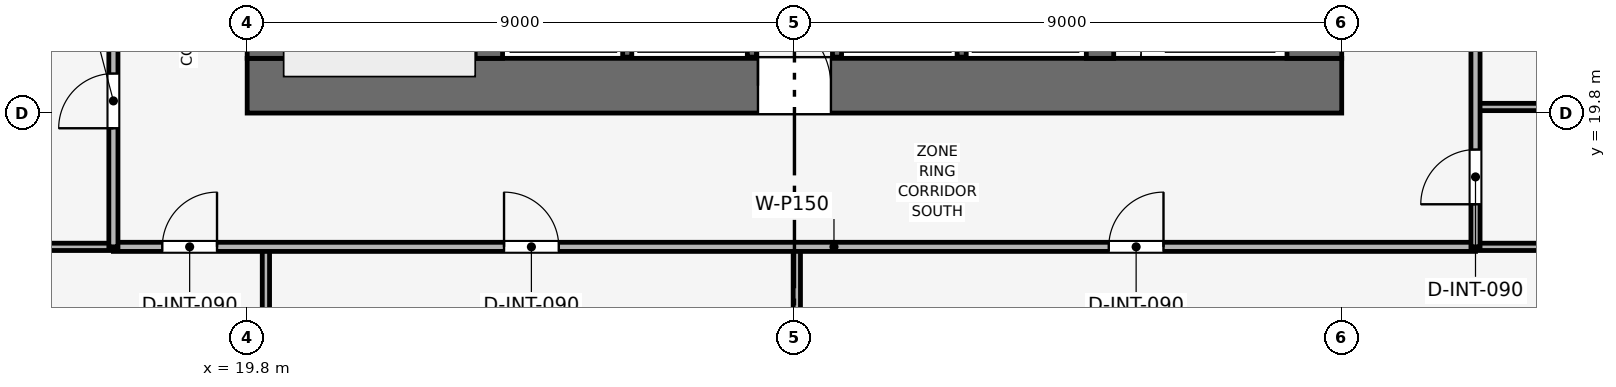
"""IFC4 building model, lengths in metres.
Left out: names, types, materials, properties, quantities, classifications, styles, units other than length and angle.
Written with IfcOpenShell. Run it as: python <this file> out.ifc"""

import sys

from ifc_helpers import new_model, si_unit, direction, frame, frame_2d, origin, place, context, subcontext, project, spatial, rectangle, extrude, element, fill, save


model = new_model("IFC4")
c1 = context("Model", 3, precision=1e-05, world=origin(), true_north=direction((0.0, 1.0)))
c2 = subcontext(c1, "Body", "Model", "MODEL_VIEW")
j1 = project(units=[si_unit("LENGTHUNIT", "METRE"), si_unit("PLANEANGLEUNIT", "RADIAN")], contexts=[c1])
p1 = place(None, origin())
s1 = spatial("IfcSite", under=j1, at=p1, CompositionType="ELEMENT")
p2 = place(p1, origin())
s2 = spatial("IfcBuilding", under=s1, at=p2, CompositionType="ELEMENT")
p3 = place(p2, frame((0.0, 0.0, 132.9)))
s3 = spatial("IfcBuildingStorey", under=s2, at=p3, CompositionType="ELEMENT", Elevation=132.9)
p4 = place(p3, frame((19.8, 20.25, 0.0), z_axis=(0.0, 0.0, 1.0), x_axis=(1.0, 0.0, 0.0)))
e1 = element("IfcWall", 1, at=p4, inside=s3, PredefinedType="SHEAR", context=c2, shape_type="SweptSolid", body=[
    extrude(rectangle(XDim=18.0, YDim=0.9, at=frame_2d((9.0, 0.0))), origin(), (0.0, 0.0, 1.0), 5.4),
])
p5 = place(p4, frame((8.4, 0.0, 0.0)))
e2 = element("IfcOpeningElement", 2, at=p5, cuts=e1, PredefinedType="OPENING", context=c2, shape_type="SweptSolid", body=[
    extrude(rectangle(XDim=1.2, YDim=2.2, at=frame_2d((0.6, 1.1))), frame((0.0, 0.46, 0.0), z_axis=(0.0, -1.0, 0.0), x_axis=(1.0, 0.0, 0.0)), (0.0, 0.0, 1.0), 0.92),
])
p6 = place(p3, frame((20.25, 20.7, 0.0), z_axis=(0.0, 0.0, 1.0), x_axis=(0.0, 1.0, 0.0)))
e3 = element("IfcWall", 3, at=p6, inside=s3, PredefinedType="SHEAR", context=c2, shape_type="SweptSolid", body=[
    extrude(rectangle(XDim=16.2, YDim=0.9, at=frame_2d((8.1, 0.0))), origin(), (0.0, 0.0, 1.0), 5.4),
])
p7 = place(p6, frame((10.1, 0.0, 0.0)))
e4 = element("IfcOpeningElement", 4, at=p7, cuts=e3, PredefinedType="OPENING", context=c2, shape_type="SweptSolid", body=[
    extrude(rectangle(XDim=1.1, YDim=2.15, at=frame_2d((0.55, 1.075))), frame((0.0, 0.46, 0.0), z_axis=(0.0, -1.0, 0.0), x_axis=(1.0, 0.0, 0.0)), (0.0, 0.0, 1.0), 0.92),
])
p8 = place(p3, frame((37.35, 20.7, 0.0), z_axis=(0.0, 0.0, 1.0), x_axis=(0.0, 1.0, 0.0)))
e5 = element("IfcWall", 5, at=p8, inside=s3, PredefinedType="SHEAR", context=c2, shape_type="SweptSolid", body=[
    extrude(rectangle(XDim=16.2, YDim=0.9, at=frame_2d((8.1, 0.0))), origin(), (0.0, 0.0, 1.0), 5.4),
])
p9 = place(p8, frame((4.6, 0.0, 0.0)))
e6 = element("IfcOpeningElement", 6, at=p9, cuts=e5, PredefinedType="OPENING", context=c2, shape_type="SweptSolid", body=[
    extrude(rectangle(XDim=1.1, YDim=2.15, at=frame_2d((0.55, 1.075))), frame((0.0, 0.46, 0.0), z_axis=(0.0, -1.0, 0.0), x_axis=(1.0, 0.0, 0.0)), (0.0, 0.0, 1.0), 0.92),
])
for number, where, z_axis, x_axis in (
    (7, (23.775, 20.7, 0.0), (0.0, 0.0, 1.0), (0.0, 1.0, 0.0)),
    (8, (33.825, 20.7, 0.0), (0.0, 0.0, 1.0), (0.0, 1.0, 0.0)),
):
    element("IfcWall", number, at=place(p3, frame(where, z_axis=z_axis, x_axis=x_axis)), inside=s3, PredefinedType="SHEAR", context=c2, shape_type="SweptSolid", body=[
        extrude(rectangle(XDim=16.2, YDim=0.45, at=frame_2d((8.1, 0.0))), origin(), (0.0, 0.0, 1.0), 5.4),
    ])
for number, where, z_axis, x_axis in (
    (9, (26.05, 20.72, 0.0), (0.0, 0.0, 1.0), (0.0, 1.0, 0.0)),
    (10, (28.1, 20.72, 0.0), (0.0, 0.0, 1.0), (0.0, 1.0, 0.0)),
    (11, (29.5, 20.72, 0.0), (0.0, 0.0, 1.0), (0.0, 1.0, 0.0)),
    (12, (31.55, 20.72, 0.0), (0.0, 0.0, 1.0), (0.0, 1.0, 0.0)),
):
    element("IfcWall", number, at=place(p3, frame(where, z_axis=z_axis, x_axis=x_axis)), inside=s3, PredefinedType="SHEAR", context=c2, shape_type="SweptSolid", body=[
        extrude(rectangle(XDim=2.26, YDim=0.15, at=frame_2d((1.13, 0.0))), origin(), (0.0, 0.0, 1.0), 5.145),
    ])
p10 = place(p3, frame((20.108, 2.83, 0.0), z_axis=(0.0, 0.0, 1.0), x_axis=(0.0, 1.0, 0.0)))
e13 = element("IfcWall", 13, at=p10, inside=s3, PredefinedType="PARTITIONING", context=c2, shape_type="SweptSolid", body=[
    extrude(rectangle(XDim=14.77, YDim=0.12, at=frame_2d((7.385, 0.0))), origin(), (0.0, 0.0, 1.0), 4.63),
])
p11 = place(p3, frame((28.839, 2.83, 0.0), z_axis=(0.0, 0.0, 1.0), x_axis=(0.0, 1.0, 0.0)))
e14 = element("IfcWall", 14, at=p11, inside=s3, PredefinedType="PARTITIONING", context=c2, shape_type="SweptSolid", body=[
    extrude(rectangle(XDim=14.77, YDim=0.12, at=frame_2d((7.385, 0.0))), origin(), (0.0, 0.0, 1.0), 4.68),
])
for number, where, z_axis, x_axis in (
    (15, (2.83, 17.6, 0.0), (0.0, 0.0, 1.0), (1.0, 0.0, 0.0)),
    (16, (40.0, 17.6, 0.0), (0.0, 0.0, 1.0), (1.0, 0.0, 0.0)),
    (17, (40.0, 19.9, 0.0), (0.0, 0.0, 1.0), (1.0, 0.0, 0.0)),
):
    element("IfcWall", number, at=place(p3, frame(where, z_axis=z_axis, x_axis=x_axis)), inside=s3, PredefinedType="PARTITIONING", context=c2, shape_type="SweptSolid", body=[
        extrude(rectangle(XDim=14.77, YDim=0.12, at=frame_2d((7.385, 0.0))), origin(), (0.0, 0.0, 1.0), 4.63),
    ])
p12 = place(p3, frame((17.6, 17.6, 0.0), z_axis=(0.0, 0.0, 1.0), x_axis=(1.0, 0.0, 0.0)))
e18 = element("IfcWall", 18, at=p12, inside=s3, PredefinedType="PARTITIONING", context=c2, shape_type="SweptSolid", body=[
    extrude(rectangle(XDim=22.4, YDim=0.15, at=frame_2d((11.2, 0.0))), origin(), (0.0, 0.0, 1.0), 4.68),
])
p13 = place(p12, frame((0.804, 0.0, 0.0)))
e19 = element("IfcOpeningElement", 19, at=p13, cuts=e18, PredefinedType="OPENING", context=c2, shape_type="SweptSolid", body=[
    extrude(rectangle(XDim=0.9, YDim=2.1, at=frame_2d((0.45, 1.05))), frame((0.0, 0.085, 0.0), z_axis=(0.0, -1.0, 0.0), x_axis=(1.0, 0.0, 0.0)), (0.0, 0.0, 1.0), 0.17),
])
p14 = place(p12, frame((6.424, 0.0, 0.0)))
e20 = element("IfcOpeningElement", 20, at=p14, cuts=e18, PredefinedType="OPENING", context=c2, shape_type="SweptSolid", body=[
    extrude(rectangle(XDim=0.9, YDim=2.1, at=frame_2d((0.45, 1.05))), frame((0.0, 0.085, 0.0), z_axis=(0.0, -1.0, 0.0), x_axis=(1.0, 0.0, 0.0)), (0.0, 0.0, 1.0), 0.17),
])
p15 = place(p12, frame((16.369, 0.0, 0.0)))
e21 = element("IfcOpeningElement", 21, at=p15, cuts=e18, PredefinedType="OPENING", context=c2, shape_type="SweptSolid", body=[
    extrude(rectangle(XDim=0.9, YDim=2.1, at=frame_2d((0.45, 1.05))), frame((0.0, 0.085, 0.0), z_axis=(0.0, -1.0, 0.0), x_axis=(1.0, 0.0, 0.0)), (0.0, 0.0, 1.0), 0.17),
])
p16 = place(p3, frame((17.6, 17.6, 0.0), z_axis=(0.0, 0.0, 1.0), x_axis=(0.0, 1.0, 0.0)))
e22 = element("IfcWall", 22, at=p16, inside=s3, PredefinedType="PARTITIONING", context=c2, shape_type="SweptSolid", body=[
    extrude(rectangle(XDim=22.4, YDim=0.15, at=frame_2d((11.2, 0.0))), origin(), (0.0, 0.0, 1.0), 4.68),
])
p17 = place(p16, frame((1.95, 0.0, 0.0)))
e23 = element("IfcOpeningElement", 23, at=p17, cuts=e22, PredefinedType="OPENING", context=c2, shape_type="SweptSolid", body=[
    extrude(rectangle(XDim=0.9, YDim=2.1, at=frame_2d((0.45, 1.05))), frame((0.0, 0.085, 0.0), z_axis=(0.0, -1.0, 0.0), x_axis=(1.0, 0.0, 0.0)), (0.0, 0.0, 1.0), 0.17),
])
p18 = place(p16, frame((5.75, 0.0, 0.0)))
e24 = element("IfcOpeningElement", 24, at=p18, cuts=e22, PredefinedType="OPENING", context=c2, shape_type="SweptSolid", body=[
    extrude(rectangle(XDim=0.9, YDim=2.1, at=frame_2d((0.45, 1.05))), frame((0.0, 0.085, 0.0), z_axis=(0.0, -1.0, 0.0), x_axis=(1.0, 0.0, 0.0)), (0.0, 0.0, 1.0), 0.17),
])
p19 = place(p16, frame((8.65, 0.0, 0.0)))
e25 = element("IfcOpeningElement", 25, at=p19, cuts=e22, PredefinedType="OPENING", context=c2, shape_type="SweptSolid", body=[
    extrude(rectangle(XDim=0.9, YDim=2.1, at=frame_2d((0.45, 1.05))), frame((0.0, 0.085, 0.0), z_axis=(0.0, -1.0, 0.0), x_axis=(1.0, 0.0, 0.0)), (0.0, 0.0, 1.0), 0.17),
])
p20 = place(p16, frame((11.4, 0.0, 0.0)))
e26 = element("IfcOpeningElement", 26, at=p20, cuts=e22, PredefinedType="OPENING", context=c2, shape_type="SweptSolid", body=[
    extrude(rectangle(XDim=0.95, YDim=2.1, at=frame_2d((0.475, 1.05))), frame((0.0, 0.085, 0.0), z_axis=(0.0, -1.0, 0.0), x_axis=(1.0, 0.0, 0.0)), (0.0, 0.0, 1.0), 0.17),
])
p21 = place(p16, frame((17.35, 0.0, 0.0)))
e27 = element("IfcOpeningElement", 27, at=p21, cuts=e22, PredefinedType="OPENING", context=c2, shape_type="SweptSolid", body=[
    extrude(rectangle(XDim=0.9, YDim=2.1, at=frame_2d((0.45, 1.05))), frame((0.0, 0.085, 0.0), z_axis=(0.0, -1.0, 0.0), x_axis=(1.0, 0.0, 0.0)), (0.0, 0.0, 1.0), 0.17),
])
p22 = place(p3, frame((40.0, 17.6, 0.0), z_axis=(0.0, 0.0, 1.0), x_axis=(0.0, 1.0, 0.0)))
e28 = element("IfcWall", 28, at=p22, inside=s3, PredefinedType="PARTITIONING", context=c2, shape_type="SweptSolid", body=[
    extrude(rectangle(XDim=22.4, YDim=0.15, at=frame_2d((11.2, 0.0))), origin(), (0.0, 0.0, 1.0), 4.68),
])
p23 = place(p22, frame((0.7, 0.0, 0.0)))
e29 = element("IfcOpeningElement", 29, at=p23, cuts=e28, PredefinedType="OPENING", context=c2, shape_type="SweptSolid", body=[
    extrude(rectangle(XDim=0.9, YDim=2.1, at=frame_2d((0.45, 1.05))), frame((0.0, 0.085, 0.0), z_axis=(0.0, -1.0, 0.0), x_axis=(1.0, 0.0, 0.0)), (0.0, 0.0, 1.0), 0.17),
])
p24 = place(p22, frame((6.378, 0.0, 0.0)))
e30 = element("IfcOpeningElement", 30, at=p24, cuts=e28, PredefinedType="OPENING", context=c2, shape_type="SweptSolid", body=[
    extrude(rectangle(XDim=0.9, YDim=2.1, at=frame_2d((0.45, 1.05))), frame((0.0, 0.085, 0.0), z_axis=(0.0, -1.0, 0.0), x_axis=(1.0, 0.0, 0.0)), (0.0, 0.0, 1.0), 0.17),
])
p25 = place(p22, frame((16.428, 0.0, 0.0)))
e31 = element("IfcOpeningElement", 31, at=p25, cuts=e28, PredefinedType="OPENING", context=c2, shape_type="SweptSolid", body=[
    extrude(rectangle(XDim=0.9, YDim=2.1, at=frame_2d((0.45, 1.05))), frame((0.0, 0.085, 0.0), z_axis=(0.0, -1.0, 0.0), x_axis=(1.0, 0.0, 0.0)), (0.0, 0.0, 1.0), 0.17),
])
p26 = place(p13, origin())
e32 = element("IfcDoor", 32, at=p26, inside=s3, OperationType="SINGLE_SWING_RIGHT", PredefinedType="DOOR", context=c2, shape_type="SweptSolid", body=[
    extrude(rectangle(XDim=0.9, YDim=2.1, at=frame_2d((0.45, 1.05))), frame((0.0, 0.025, 0.0), z_axis=(0.0, -1.0, 0.0), x_axis=(1.0, 0.0, 0.0)), (0.0, 0.0, 1.0), 0.05),
])
fill(e19, e32)
p27 = place(p14, origin())
e33 = element("IfcDoor", 33, at=p27, inside=s3, OperationType="SINGLE_SWING_LEFT", PredefinedType="DOOR", context=c2, shape_type="SweptSolid", body=[
    extrude(rectangle(XDim=0.9, YDim=2.1, at=frame_2d((0.45, 1.05))), frame((0.0, 0.025, 0.0), z_axis=(0.0, -1.0, 0.0), x_axis=(1.0, 0.0, 0.0)), (0.0, 0.0, 1.0), 0.05),
])
fill(e20, e33)
p28 = place(p15, origin())
e34 = element("IfcDoor", 34, at=p28, inside=s3, OperationType="SINGLE_SWING_RIGHT", PredefinedType="DOOR", context=c2, shape_type="SweptSolid", body=[
    extrude(rectangle(XDim=0.9, YDim=2.1, at=frame_2d((0.45, 1.05))), frame((0.0, 0.025, 0.0), z_axis=(0.0, -1.0, 0.0), x_axis=(1.0, 0.0, 0.0)), (0.0, 0.0, 1.0), 0.05),
])
fill(e21, e34)
p29 = place(p17, origin())
e35 = element("IfcDoor", 35, at=p29, inside=s3, OperationType="SINGLE_SWING_LEFT", PredefinedType="DOOR", context=c2, shape_type="SweptSolid", body=[
    extrude(rectangle(XDim=0.9, YDim=2.1, at=frame_2d((0.45, 1.05))), frame((0.0, 0.025, 0.0), z_axis=(0.0, -1.0, 0.0), x_axis=(1.0, 0.0, 0.0)), (0.0, 0.0, 1.0), 0.05),
])
fill(e23, e35)
p30 = place(p23, origin())
e36 = element("IfcDoor", 36, at=p30, inside=s3, OperationType="SINGLE_SWING_LEFT", PredefinedType="DOOR", context=c2, shape_type="SweptSolid", body=[
    extrude(rectangle(XDim=0.9, YDim=2.1, at=frame_2d((0.45, 1.05))), frame((0.0, 0.025, 0.0), z_axis=(0.0, -1.0, 0.0), x_axis=(1.0, 0.0, 0.0)), (0.0, 0.0, 1.0), 0.05),
])
fill(e29, e36)
p31 = place(p5, origin())
e37 = element("IfcDoor", 37, at=p31, inside=s3, OperationType="SINGLE_SWING_LEFT", PredefinedType="DOOR", context=c2, shape_type="SweptSolid", body=[
    extrude(rectangle(XDim=1.2, YDim=2.2, at=frame_2d((0.6, 1.1))), frame((0.0, 0.025, 0.0), z_axis=(0.0, -1.0, 0.0), x_axis=(1.0, 0.0, 0.0)), (0.0, 0.0, 1.0), 0.05),
])
fill(e2, e37)
save(model, sys.argv[1])
